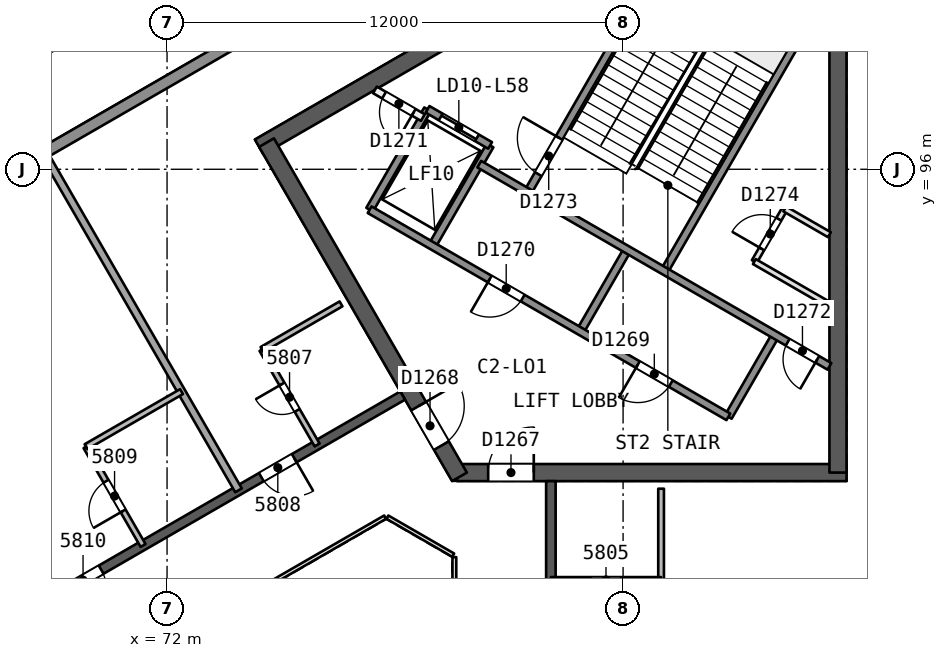
"""IFC4 building model, lengths in metres.
Left out: names, types, materials, properties, quantities, classifications, styles, units other than length and angle.
Written with IfcOpenShell. Run it as: python <this file> out.ifc"""

import sys

from ifc_helpers import new_model, si_unit, direction, frame, frame_2d, origin, place, context, subcontext, project, spatial, rectangle, extrude, element, fill, save


model = new_model("IFC4")
c1 = context("Model", 3, precision=1e-05, world=origin(), true_north=direction((0.0, 1.0)))
c2 = subcontext(c1, "Body", "Model", "MODEL_VIEW")
j1 = project(units=[si_unit("LENGTHUNIT", "METRE"), si_unit("PLANEANGLEUNIT", "RADIAN")], contexts=[c1])
p1 = place(None, origin())
s1 = spatial("IfcSite", under=j1, at=p1, CompositionType="ELEMENT")
p2 = place(p1, origin())
s2 = spatial("IfcBuilding", under=s1, at=p2, CompositionType="ELEMENT")
p3 = place(p2, frame((0.0, 0.0, 235.4)))
s3 = spatial("IfcBuildingStorey", under=s2, at=p3, CompositionType="ELEMENT", Elevation=235.4)
p4 = place(p3, frame((79.63, 88.019, 0.0), z_axis=(0.0, 0.0, 1.0), x_axis=(1.0, 0.0, 0.0)))
e1 = element("IfcWall", 1, at=p4, inside=s3, PredefinedType="SHEAR", context=c2, shape_type="SweptSolid", body=[
    extrude(rectangle(XDim=10.25, YDim=0.45, at=frame_2d((5.125, 0.0))), origin(), (0.0, 0.0, 1.0), 3.7),
])
p5 = place(p4, frame((0.82, 0.0, 0.0)))
e2 = element("IfcOpeningElement", 2, at=p5, cuts=e1, PredefinedType="OPENING", context=c2, shape_type="SweptSolid", body=[
    extrude(rectangle(XDim=1.2, YDim=2.1, at=frame_2d((0.6, 1.05))), frame((0.0, 0.235, 0.0), z_axis=(0.0, -1.0, 0.0), x_axis=(1.0, 0.0, 0.0)), (0.0, 0.0, 1.0), 0.471),
])
p6 = place(p3, frame((89.655, 88.019, 0.0), z_axis=(0.0, 0.0, 1.0), x_axis=(0.0, 1.0, 0.0)))
e3 = element("IfcWall", 3, at=p6, inside=s3, PredefinedType="SHEAR", context=c2, shape_type="SweptSolid", body=[
    extrude(rectangle(XDim=14.108, YDim=0.45, at=frame_2d((7.054, 0.0))), origin(), (0.0, 0.0, 1.0), 3.7),
])
p7 = place(p3, frame((86.723, 103.69, 0.0), z_axis=(0.0, 0.0, 1.0), x_axis=(-0.866022713978, -0.500004658852, 0.0)))
e4 = element("IfcWall", 4, at=p7, inside=s3, PredefinedType="SHEAR", context=c2, shape_type="SweptSolid", body=[
    extrude(rectangle(XDim=14.203, YDim=0.45, at=frame_2d((7.102, 0.0))), origin(), (0.0, 0.0, 1.0), 3.7),
])
p8 = place(p3, frame((74.617, 96.701, 0.0), z_axis=(0.0, 0.0, 1.0), x_axis=(0.499994385119, -0.866028645513, 0.0)))
e5 = element("IfcWall", 5, at=p8, inside=s3, PredefinedType="SHEAR", context=c2, shape_type="SweptSolid", body=[
    extrude(rectangle(XDim=10.155, YDim=0.45, at=frame_2d((5.077, 0.0))), origin(), (0.0, 0.0, 1.0), 3.7),
])
p9 = place(p8, frame((8.005, 0.0, 0.0)))
e6 = element("IfcOpeningElement", 6, at=p9, cuts=e5, PredefinedType="OPENING", context=c2, shape_type="SweptSolid", body=[
    extrude(rectangle(XDim=1.2, YDim=2.1, at=frame_2d((0.6, 1.05))), frame((0.0, 0.235, 0.0), z_axis=(0.0, -1.0, 0.0), x_axis=(1.0, 0.0, 0.0)), (0.0, 0.0, 1.0), 0.471),
])
p10 = place(p3, frame((82.1, 72.206, 0.0), z_axis=(0.0, 0.0, 1.0), x_axis=(0.0, 1.0, 0.0)))
e7 = element("IfcWall", 7, at=p10, inside=s3, PredefinedType="SHEAR", context=c2, shape_type="SweptSolid", body=[
    extrude(rectangle(XDim=15.588, YDim=0.25, at=frame_2d((7.794, 0.0))), origin(), (0.0, 0.0, 1.0), 3.3),
])
p11 = place(p10, frame((2.15, 0.0, 0.0)))
e8 = element("IfcOpeningElement", 8, at=p11, cuts=e7, PredefinedType="OPENING", context=c2, shape_type="SweptSolid", body=[
    extrude(rectangle(XDim=1.0, YDim=2.1, at=frame_2d((0.5, 1.05))), frame((0.0, 0.135, 0.0), z_axis=(0.0, -1.0, 0.0), x_axis=(1.0, 0.0, 0.0)), (0.0, 0.0, 1.0), 0.271),
])
p12 = place(p10, frame((7.662, 0.0, 0.0)))
e9 = element("IfcOpeningElement", 9, at=p12, cuts=e7, PredefinedType="OPENING", context=c2, shape_type="SweptSolid", body=[
    extrude(rectangle(XDim=1.2, YDim=2.4, at=frame_2d((0.6, 1.2))), frame((0.0, 0.135, 0.0), z_axis=(0.0, -1.0, 0.0), x_axis=(1.0, 0.0, 0.0)), (0.0, 0.0, 1.0), 0.271),
])
p13 = place(p10, frame((11.606, 0.0, 0.0)))
e10 = element("IfcOpeningElement", 10, at=p13, cuts=e7, PredefinedType="OPENING", context=c2, shape_type="SweptSolid", body=[
    extrude(rectangle(XDim=1.0, YDim=2.1, at=frame_2d((0.5, 1.05))), frame((0.0, 0.135, 0.0), z_axis=(0.0, -1.0, 0.0), x_axis=(1.0, 0.0, 0.0)), (0.0, 0.0, 1.0), 0.271),
])
p14 = place(p3, frame((78.2, 90.046, 0.0), z_axis=(0.0, 0.0, 1.0), x_axis=(-0.866026492143, -0.499998114903, 0.0)))
e11 = element("IfcWall", 11, at=p14, inside=s3, PredefinedType="SHEAR", context=c2, shape_type="SweptSolid", body=[
    extrude(rectangle(XDim=15.588, YDim=0.25, at=frame_2d((7.794, 0.0))), origin(), (0.0, 0.0, 1.0), 3.3),
])
p15 = place(p14, frame((3.294, 0.0, 0.0)))
e12 = element("IfcOpeningElement", 12, at=p15, cuts=e11, PredefinedType="OPENING", context=c2, shape_type="SweptSolid", body=[
    extrude(rectangle(XDim=1.0, YDim=2.1, at=frame_2d((0.5, 1.05))), frame((0.0, 0.135, 0.0), z_axis=(0.0, -1.0, 0.0), x_axis=(1.0, 0.0, 0.0)), (0.0, 0.0, 1.0), 0.271),
])
p16 = place(p14, frame((9.162, 0.0, 0.0)))
e13 = element("IfcOpeningElement", 13, at=p16, cuts=e11, PredefinedType="OPENING", context=c2, shape_type="SweptSolid", body=[
    extrude(rectangle(XDim=1.1, YDim=2.1, at=frame_2d((0.55, 1.05))), frame((0.0, 0.135, 0.0), z_axis=(0.0, -1.0, 0.0), x_axis=(1.0, 0.0, 0.0)), (0.0, 0.0, 1.0), 0.271),
])
p17 = place(p14, frame((11.762, 0.0, 0.0)))
e14 = element("IfcOpeningElement", 14, at=p17, cuts=e11, PredefinedType="OPENING", context=c2, shape_type="SweptSolid", body=[
    extrude(rectangle(XDim=1.0, YDim=2.1, at=frame_2d((0.5, 1.05))), frame((0.0, 0.135, 0.0), z_axis=(0.0, -1.0, 0.0), x_axis=(1.0, 0.0, 0.0)), (0.0, 0.0, 1.0), 0.271),
])
p18 = place(p3, frame((85.0, 87.595, 0.0), z_axis=(0.0, 0.0, 1.0), x_axis=(0.0, -1.0, 0.0)))
e15 = element("IfcWall", 15, at=p18, inside=s3, PredefinedType="PARTITIONING", context=c2, shape_type="SweptSolid", body=[
    extrude(rectangle(XDim=2.401, YDim=0.15, at=frame_2d((1.2, 0.0))), origin(), (0.0, 0.0, 1.0), 3.3),
])
p19 = place(p3, frame((85.0, 85.194, 0.0), z_axis=(0.0, 0.0, 1.0), x_axis=(-1.0, 0.0, 0.0)))
e16 = element("IfcWall", 16, at=p19, inside=s3, PredefinedType="PARTITIONING", context=c2, shape_type="SweptSolid", body=[
    extrude(rectangle(XDim=2.9, YDim=0.15, at=frame_2d((1.45, 0.0))), origin(), (0.0, 0.0, 1.0), 3.3),
])
p20 = place(p19, frame((1.05, 0.0, 0.0)))
e17 = element("IfcOpeningElement", 17, at=p20, cuts=e16, PredefinedType="OPENING", context=c2, shape_type="SweptSolid", body=[
    extrude(rectangle(XDim=0.8, YDim=2.1, at=frame_2d((0.4, 1.05))), frame((0.0, 0.085, 0.0), z_axis=(0.0, -1.0, 0.0), x_axis=(1.0, 0.0, 0.0)), (0.0, 0.0, 1.0), 0.171),
])
p21 = place(p3, frame((75.948, 88.746, 0.0), z_axis=(0.0, 0.0, 1.0), x_axis=(-0.499987231761, 0.866032775405, 0.0)))
e18 = element("IfcWall", 18, at=p21, inside=s3, PredefinedType="PARTITIONING", context=c2, shape_type="SweptSolid", body=[
    extrude(rectangle(XDim=2.9, YDim=0.15, at=frame_2d((1.45, 0.0))), origin(), (0.0, 0.0, 1.0), 3.3),
])
p22 = place(p21, frame((1.05, 0.0, 0.0)))
e19 = element("IfcOpeningElement", 19, at=p22, cuts=e18, PredefinedType="OPENING", context=c2, shape_type="SweptSolid", body=[
    extrude(rectangle(XDim=0.8, YDim=2.1, at=frame_2d((0.4, 1.05))), frame((0.0, 0.085, 0.0), z_axis=(0.0, -1.0, 0.0), x_axis=(1.0, 0.0, 0.0)), (0.0, 0.0, 1.0), 0.171),
])
p23 = place(p3, frame((74.498, 91.257, 0.0), z_axis=(0.0, 0.0, 1.0), x_axis=(0.866038271014, 0.499977712642, 0.0)))
e20 = element("IfcWall", 20, at=p23, inside=s3, PredefinedType="PARTITIONING", context=c2, shape_type="SweptSolid", body=[
    extrude(rectangle(XDim=2.401, YDim=0.15, at=frame_2d((1.2, 0.0))), origin(), (0.0, 0.0, 1.0), 3.3),
])
p24 = place(p3, frame((68.828, 96.302, 0.0), z_axis=(0.0, 0.0, 1.0), x_axis=(0.499992962407, -0.866029466902, 0.0)))
e21 = element("IfcWall", 21, at=p24, inside=s3, PredefinedType="PARTITIONING", context=c2, shape_type="SweptSolid", body=[
    extrude(rectangle(XDim=10.104, YDim=0.2, at=frame_2d((5.052, 0.0))), origin(), (0.0, 0.0, 1.0), 3.3),
])
p25 = place(p3, frame((71.368, 86.102, 0.0), z_axis=(0.0, 0.0, 1.0), x_axis=(-0.50002537861, 0.866010750942, 0.0)))
e22 = element("IfcWall", 22, at=p25, inside=s3, PredefinedType="PARTITIONING", context=c2, shape_type="SweptSolid", body=[
    extrude(rectangle(XDim=3.0, YDim=0.15, at=frame_2d((1.5, 0.0))), origin(), (0.0, 0.0, 1.0), 3.3),
])
p26 = place(p25, frame((1.05, 0.0, 0.0)))
e23 = element("IfcOpeningElement", 23, at=p26, cuts=e22, PredefinedType="OPENING", context=c2, shape_type="SweptSolid", body=[
    extrude(rectangle(XDim=0.9, YDim=2.1, at=frame_2d((0.45, 1.05))), frame((0.0, 0.085, 0.0), z_axis=(0.0, -1.0, 0.0), x_axis=(1.0, 0.0, 0.0)), (0.0, 0.0, 1.0), 0.171),
])
p27 = place(p3, frame((69.868, 88.7, 0.0), z_axis=(0.0, 0.0, 1.0), x_axis=(0.865996321171, 0.50005036918, 0.0)))
e24 = element("IfcWall", 24, at=p27, inside=s3, PredefinedType="PARTITIONING", context=c2, shape_type="SweptSolid", body=[
    extrude(rectangle(XDim=2.9, YDim=0.15, at=frame_2d((1.45, 0.0))), origin(), (0.0, 0.0, 1.0), 3.3),
])
p28 = place(p3, frame((44.715, 82.552, 0.0), z_axis=(0.0, 0.0, 1.0), x_axis=(0.866025334516, 0.500000119977, 0.0)))
e25 = element("IfcWall", 25, at=p28, inside=s3, PredefinedType="SOLIDWALL", context=c2, shape_type="SweptSolid", body=[
    extrude(rectangle(XDim=49.903, YDim=0.3, at=frame_2d((24.952, 0.0))), origin(), (0.0, 0.0, 1.0), 3.3),
])
p29 = place(p28, frame((23.284, 0.0, 0.0)))
e26 = element("IfcOpeningElement", 26, at=p29, cuts=e25, PredefinedType="OPENING", context=c2, shape_type="SweptSolid", body=[
    extrude(rectangle(XDim=2.4, YDim=2.4, at=frame_2d((1.2, 1.2))), frame((0.0, 0.161, 0.0), z_axis=(0.0, -1.0, 0.0), x_axis=(1.0, 0.0, 0.0)), (0.0, 0.0, 1.0), 0.321),
])
p30 = place(p28, frame((37.674, 0.0, 0.0)))
e27 = element("IfcOpeningElement", 27, at=p30, cuts=e25, PredefinedType="OPENING", context=c2, shape_type="SweptSolid", body=[
    extrude(rectangle(XDim=2.4, YDim=2.4, at=frame_2d((1.2, 1.2))), frame((0.0, 0.161, 0.0), z_axis=(0.0, -1.0, 0.0), x_axis=(1.0, 0.0, 0.0)), (0.0, 0.0, 1.0), 0.321),
])
p31 = place(p28, frame((9.362, 0.0, 0.0)))
e28 = element("IfcOpeningElement", 28, at=p31, cuts=e25, PredefinedType="OPENING", context=c2, shape_type="SweptSolid", body=[
    extrude(rectangle(XDim=2.4, YDim=2.4, at=frame_2d((1.2, 1.2))), frame((0.0, 0.161, 0.0), z_axis=(0.0, -1.0, 0.0), x_axis=(1.0, 0.0, 0.0)), (0.0, 0.0, 1.0), 0.321),
])
p32 = place(p3, frame((86.77, 89.486, 0.0), z_axis=(0.0, 0.0, 1.0), x_axis=(0.499961042966, 0.86604789447, 0.0)))
e29 = element("IfcWall", 29, at=p32, inside=s3, PredefinedType="SOLIDWALL", context=c2, shape_type="SweptSolid", body=[
    extrude(rectangle(XDim=2.48, YDim=0.2, at=frame_2d((1.24, 0.0))), origin(), (0.0, 0.0, 1.0), 3.3),
])
p33 = place(p3, frame((87.454, 93.571, 0.0), z_axis=(0.0, 0.0, 1.0), x_axis=(0.499995408039, 0.866028054938, 0.0)))
e30 = element("IfcWall", 30, at=p33, inside=s3, PredefinedType="PARTITIONING", context=c2, shape_type="SweptSolid", body=[
    extrude(rectangle(XDim=1.6, YDim=0.15, at=frame_2d((0.8, 0.0))), origin(), (0.0, 0.0, 1.0), 3.3),
])
p34 = place(p33, frame((0.387, 0.0, 0.0)))
e31 = element("IfcOpeningElement", 31, at=p34, cuts=e30, PredefinedType="OPENING", context=c2, shape_type="SweptSolid", body=[
    extrude(rectangle(XDim=0.9, YDim=2.1, at=frame_2d((0.45, 1.05))), frame((0.0, 0.085, 0.0), z_axis=(0.0, -1.0, 0.0), x_axis=(1.0, 0.0, 0.0)), (0.0, 0.0, 1.0), 0.171),
])
p35 = place(p3, frame((85.087, 93.321, 0.0), z_axis=(0.0, 0.0, 1.0), x_axis=(0.500019787375, 0.866013979237, 0.0)))
e32 = element("IfcWall", 32, at=p35, inside=s3, PredefinedType="SOLIDWALL", context=c2, shape_type="SweptSolid", body=[
    extrude(rectangle(XDim=7.7, YDim=0.2, at=frame_2d((3.85, 0.0))), origin(), (0.0, 0.0, 1.0), 3.3),
])
p36 = place(p3, frame((82.873, 91.736, 0.0), z_axis=(0.0, 0.0, 1.0), x_axis=(0.499961042966, 0.86604789447, 0.0)))
e33 = element("IfcWall", 33, at=p36, inside=s3, PredefinedType="SOLIDWALL", context=c2, shape_type="SweptSolid", body=[
    extrude(rectangle(XDim=2.48, YDim=0.2, at=frame_2d((1.24, 0.0))), origin(), (0.0, 0.0, 1.0), 3.3),
])
p37 = place(p3, frame((81.493, 95.396, 0.0), z_axis=(0.0, 0.0, 1.0), x_axis=(0.500006057782, 0.866021906294, 0.0)))
e34 = element("IfcWall", 34, at=p37, inside=s3, PredefinedType="SOLIDWALL", context=c2, shape_type="SweptSolid", body=[
    extrude(rectangle(XDim=7.7, YDim=0.2, at=frame_2d((3.85, 0.0))), origin(), (0.0, 0.0, 1.0), 3.3),
])
p38 = place(p37, frame((0.55, 0.0, 0.0)))
e35 = element("IfcOpeningElement", 35, at=p38, cuts=e34, PredefinedType="OPENING", context=c2, shape_type="SweptSolid", body=[
    extrude(rectangle(XDim=1.1, YDim=2.1, at=frame_2d((0.55, 1.05))), frame((0.0, 0.11, 0.0), z_axis=(0.0, -1.0, 0.0), x_axis=(1.0, 0.0, 0.0)), (0.0, 0.0, 1.0), 0.221),
])
for number, where, z_axis, x_axis in (
    (36, (78.976, 93.986, 0.0), (0.0, 0.0, 1.0), (0.5, 0.866, 0.0)),
    (37, (77.33, 94.936, 0.0), (0.0, 0.0, 1.0), (0.5, 0.866, 0.0)),
):
    element("IfcWall", number, at=place(p3, frame(where, z_axis=z_axis, x_axis=x_axis)), inside=s3, PredefinedType="SOLIDWALL", context=c2, shape_type="SweptSolid", body=[
        extrude(rectangle(XDim=3.05, YDim=0.2, at=frame_2d((1.525, 0.0))), origin(), (0.0, 0.0, 1.0), 3.3),
    ])
p39 = place(p3, frame((86.77, 89.486, 0.0), z_axis=(0.0, 0.0, 1.0), x_axis=(-0.86601811187, 0.500012629753, 0.0)))
e38 = element("IfcWall", 38, at=p39, inside=s3, PredefinedType="SOLIDWALL", context=c2, shape_type="SweptSolid", body=[
    extrude(rectangle(XDim=10.9, YDim=0.2, at=frame_2d((5.45, 0.0))), origin(), (0.0, 0.0, 1.0), 3.3),
])
p40 = place(p39, frame((1.75, 0.0, 0.0)))
e39 = element("IfcOpeningElement", 39, at=p40, cuts=e38, PredefinedType="OPENING", context=c2, shape_type="SweptSolid", body=[
    extrude(rectangle(XDim=1.0, YDim=2.1, at=frame_2d((0.5, 1.05))), frame((0.0, 0.11, 0.0), z_axis=(0.0, -1.0, 0.0), x_axis=(1.0, 0.0, 0.0)), (0.0, 0.0, 1.0), 0.221),
])
p41 = place(p39, frame((6.25, 0.0, 0.0)))
e40 = element("IfcOpeningElement", 40, at=p41, cuts=e38, PredefinedType="OPENING", context=c2, shape_type="SweptSolid", body=[
    extrude(rectangle(XDim=1.0, YDim=2.1, at=frame_2d((0.5, 1.05))), frame((0.0, 0.11, 0.0), z_axis=(0.0, -1.0, 0.0), x_axis=(1.0, 0.0, 0.0)), (0.0, 0.0, 1.0), 0.221),
])
p42 = place(p3, frame((89.43, 90.814, 0.0), z_axis=(0.0, 0.0, 1.0), x_axis=(-0.866018983788, 0.500011119594, 0.0)))
e41 = element("IfcWall", 41, at=p42, inside=s3, PredefinedType="SOLIDWALL", context=c2, shape_type="SweptSolid", body=[
    extrude(rectangle(XDim=10.64, YDim=0.2, at=frame_2d((5.32, 0.0))), origin(), (0.0, 0.0, 1.0), 3.3),
])
p43 = place(p42, frame((0.37, 0.0, 0.0)))
e42 = element("IfcOpeningElement", 42, at=p43, cuts=e41, PredefinedType="OPENING", context=c2, shape_type="SweptSolid", body=[
    extrude(rectangle(XDim=0.9, YDim=2.1, at=frame_2d((0.45, 1.05))), frame((0.0, 0.11, 0.0), z_axis=(0.0, -1.0, 0.0), x_axis=(1.0, 0.0, 0.0)), (0.0, 0.0, 1.0), 0.221),
])
p44 = place(p3, frame((78.73, 97.361, 0.0), z_axis=(0.0, 0.0, 1.0), x_axis=(-0.866045896294, 0.499964504253, 0.0)))
e43 = element("IfcWall", 43, at=p44, inside=s3, PredefinedType="PARTITIONING", context=c2, shape_type="SweptSolid", body=[
    extrude(rectangle(XDim=1.455, YDim=0.2, at=frame_2d((0.728, 0.0))), origin(), (0.0, 0.0, 1.0), 3.3),
])
p45 = place(p44, frame((0.278, 0.0, 0.0)))
e44 = element("IfcOpeningElement", 44, at=p45, cuts=e43, PredefinedType="OPENING", context=c2, shape_type="SweptSolid", body=[
    extrude(rectangle(XDim=0.9, YDim=2.1, at=frame_2d((0.45, 1.05))), frame((0.0, 0.11, 0.0), z_axis=(0.0, -1.0, 0.0), x_axis=(1.0, 0.0, 0.0)), (0.0, 0.0, 1.0), 0.221),
])
p46 = place(p3, frame((80.5, 96.627, 0.0), z_axis=(0.0, 0.0, 1.0), x_axis=(-0.86601224135, 0.500022797313, 0.0)))
e45 = element("IfcWall", 45, at=p46, inside=s3, PredefinedType="SOLIDWALL", context=c2, shape_type="SweptSolid", body=[
    extrude(rectangle(XDim=1.9, YDim=0.2, at=frame_2d((0.95, 0.0))), origin(), (0.0, 0.0, 1.0), 3.3),
])
p47 = place(p46, frame((0.4, 0.0, 0.0)))
e46 = element("IfcOpeningElement", 46, at=p47, cuts=e45, PredefinedType="OPENING", context=c2, shape_type="SweptSolid", body=[
    extrude(rectangle(XDim=1.1, YDim=2.1, at=frame_2d((0.55, 1.05))), frame((0.0, 0.11, 0.0), z_axis=(0.0, -1.0, 0.0), x_axis=(1.0, 0.0, 0.0)), (0.0, 0.0, 1.0), 0.221),
])
p48 = place(p3, frame((89.43, 92.43, 0.0), z_axis=(0.0, 0.0, 1.0), x_axis=(-0.866048373726, 0.499960212783, 0.0)))
e47 = element("IfcWall", 47, at=p48, inside=s3, PredefinedType="PARTITIONING", context=c2, shape_type="SweptSolid", body=[
    extrude(rectangle(XDim=2.281, YDim=0.15, at=frame_2d((1.141, 0.0))), origin(), (0.0, 0.0, 1.0), 3.3),
])
p49 = place(p3, frame((89.43, 94.278, 0.0), z_axis=(0.0, 0.0, 1.0), x_axis=(-0.865987941628, 0.500064880745, 0.0)))
e48 = element("IfcWall", 48, at=p49, inside=s3, PredefinedType="PARTITIONING", context=c2, shape_type="SweptSolid", body=[
    extrude(rectangle(XDim=1.358, YDim=0.15, at=frame_2d((0.679, 0.0))), origin(), (0.0, 0.0, 1.0), 3.3),
])
p50 = place(p3, frame((79.56, 74.206, 0.0), z_axis=(0.0, 0.0, 1.0), x_axis=(0.0, 1.0, 0.0)))
e49 = element("IfcWall", 49, at=p50, inside=s3, PredefinedType="PARTITIONING", context=c2, shape_type="SweptSolid", body=[
    extrude(rectangle(XDim=11.588, YDim=0.1, at=frame_2d((5.794, 0.0))), origin(), (0.0, 0.0, 1.0), 3.3),
])
p51 = place(p3, frame((79.53, 85.846, 0.0), z_axis=(0.0, 0.0, 1.0), x_axis=(-0.866041268327, 0.499972520799, 0.0)))
e50 = element("IfcWall", 50, at=p51, inside=s3, PredefinedType="PARTITIONING", context=c2, shape_type="SweptSolid", body=[
    extrude(rectangle(XDim=2.0, YDim=0.1, at=frame_2d((1.0, 0.0))), origin(), (0.0, 0.0, 1.0), 3.3),
])
p52 = place(p3, frame((77.738, 86.846, 0.0), z_axis=(0.0, 0.0, 1.0), x_axis=(-0.866026658274, -0.499997827154, 0.0)))
e51 = element("IfcWall", 51, at=p52, inside=s3, PredefinedType="PARTITIONING", context=c2, shape_type="SweptSolid", body=[
    extrude(rectangle(XDim=11.588, YDim=0.1, at=frame_2d((5.794, 0.0))), origin(), (0.0, 0.0, 1.0), 3.3),
])
p53 = place(p22, origin())
e52 = element("IfcDoor", 52, at=p53, inside=s3, OperationType="SINGLE_SWING_RIGHT", PredefinedType="NOTDEFINED", context=c2, shape_type="SweptSolid", body=[
    extrude(rectangle(XDim=0.8, YDim=2.1, at=frame_2d((0.4, 1.05))), frame((0.0, 0.025, 0.0), z_axis=(0.0, -1.0, 0.0), x_axis=(1.0, 0.0, 0.0)), (0.0, 0.0, 1.0), 0.05),
])
fill(e19, e52)
p54 = place(p15, origin())
e53 = element("IfcDoor", 53, at=p54, inside=s3, OperationType="SINGLE_SWING_LEFT", PredefinedType="NOTDEFINED", context=c2, shape_type="SweptSolid", body=[
    extrude(rectangle(XDim=1.0, YDim=2.1, at=frame_2d((0.5, 1.05))), frame((0.0, 0.025, 0.0), z_axis=(0.0, -1.0, 0.0), x_axis=(1.0, 0.0, 0.0)), (0.0, 0.0, 1.0), 0.05),
])
fill(e12, e53)
p55 = place(p26, origin())
e54 = element("IfcDoor", 54, at=p55, inside=s3, OperationType="SINGLE_SWING_LEFT", PredefinedType="NOTDEFINED", context=c2, shape_type="SweptSolid", body=[
    extrude(rectangle(XDim=0.9, YDim=2.1, at=frame_2d((0.45, 1.05))), frame((0.0, 0.025, 0.0), z_axis=(0.0, -1.0, 0.0), x_axis=(1.0, 0.0, 0.0)), (0.0, 0.0, 1.0), 0.05),
])
fill(e23, e54)
p56 = place(p16, origin())
e55 = element("IfcDoor", 55, at=p56, inside=s3, OperationType="SINGLE_SWING_RIGHT", PredefinedType="NOTDEFINED", context=c2, shape_type="SweptSolid", body=[
    extrude(rectangle(XDim=1.1, YDim=2.1, at=frame_2d((0.55, 1.05))), frame((0.0, 0.025, 0.0), z_axis=(0.0, -1.0, 0.0), x_axis=(1.0, 0.0, 0.0)), (0.0, 0.0, 1.0), 0.05),
])
fill(e13, e55)
p57 = place(p5, origin())
e56 = element("IfcDoor", 56, at=p57, inside=s3, OperationType="SINGLE_SWING_RIGHT", PredefinedType="NOTDEFINED", context=c2, shape_type="SweptSolid", body=[
    extrude(rectangle(XDim=1.2, YDim=2.1, at=frame_2d((0.6, 1.05))), frame((0.0, 0.025, 0.0), z_axis=(0.0, -1.0, 0.0), x_axis=(1.0, 0.0, 0.0)), (0.0, 0.0, 1.0), 0.05),
])
fill(e2, e56)
p58 = place(p9, origin())
e57 = element("IfcDoor", 57, at=p58, inside=s3, OperationType="SINGLE_SWING_LEFT", PredefinedType="NOTDEFINED", context=c2, shape_type="SweptSolid", body=[
    extrude(rectangle(XDim=1.2, YDim=2.1, at=frame_2d((0.6, 1.05))), frame((0.0, 0.025, 0.0), z_axis=(0.0, -1.0, 0.0), x_axis=(1.0, 0.0, 0.0)), (0.0, 0.0, 1.0), 0.05),
])
fill(e6, e57)
p59 = place(p47, origin())
e58 = element("IfcDoor", 58, at=p59, inside=s3, OperationType="SLIDING_TO_RIGHT", PredefinedType="NOTDEFINED", context=c2, shape_type="SweptSolid", body=[
    extrude(rectangle(XDim=1.1, YDim=2.1, at=frame_2d((0.55, 1.05))), frame((0.0, 0.025, 0.0), z_axis=(0.0, -1.0, 0.0), x_axis=(1.0, 0.0, 0.0)), (0.0, 0.0, 1.0), 0.05),
])
fill(e46, e58)
p60 = place(p40, origin())
e59 = element("IfcDoor", 59, at=p60, inside=s3, OperationType="SINGLE_SWING_RIGHT", PredefinedType="NOTDEFINED", context=c2, shape_type="SweptSolid", body=[
    extrude(rectangle(XDim=1.0, YDim=2.1, at=frame_2d((0.5, 1.05))), frame((0.0, 0.025, 0.0), z_axis=(0.0, -1.0, 0.0), x_axis=(1.0, 0.0, 0.0)), (0.0, 0.0, 1.0), 0.05),
])
fill(e39, e59)
p61 = place(p41, origin())
e60 = element("IfcDoor", 60, at=p61, inside=s3, OperationType="SINGLE_SWING_RIGHT", PredefinedType="NOTDEFINED", context=c2, shape_type="SweptSolid", body=[
    extrude(rectangle(XDim=1.0, YDim=2.1, at=frame_2d((0.5, 1.05))), frame((0.0, 0.025, 0.0), z_axis=(0.0, -1.0, 0.0), x_axis=(1.0, 0.0, 0.0)), (0.0, 0.0, 1.0), 0.05),
])
fill(e40, e60)
p62 = place(p45, origin())
e61 = element("IfcDoor", 61, at=p62, inside=s3, OperationType="SINGLE_SWING_LEFT", PredefinedType="NOTDEFINED", context=c2, shape_type="SweptSolid", body=[
    extrude(rectangle(XDim=0.9, YDim=2.1, at=frame_2d((0.45, 1.05))), frame((0.0, 0.025, 0.0), z_axis=(0.0, -1.0, 0.0), x_axis=(1.0, 0.0, 0.0)), (0.0, 0.0, 1.0), 0.05),
])
fill(e44, e61)
p63 = place(p43, origin())
e62 = element("IfcDoor", 62, at=p63, inside=s3, OperationType="SINGLE_SWING_LEFT", PredefinedType="NOTDEFINED", context=c2, shape_type="SweptSolid", body=[
    extrude(rectangle(XDim=0.9, YDim=2.1, at=frame_2d((0.45, 1.05))), frame((0.0, 0.025, 0.0), z_axis=(0.0, -1.0, 0.0), x_axis=(1.0, 0.0, 0.0)), (0.0, 0.0, 1.0), 0.05),
])
fill(e42, e62)
p64 = place(p38, origin())
e63 = element("IfcDoor", 63, at=p64, inside=s3, OperationType="SINGLE_SWING_RIGHT", PredefinedType="NOTDEFINED", context=c2, shape_type="SweptSolid", body=[
    extrude(rectangle(XDim=1.1, YDim=2.1, at=frame_2d((0.55, 1.05))), frame((0.0, 0.025, 0.0), z_axis=(0.0, -1.0, 0.0), x_axis=(1.0, 0.0, 0.0)), (0.0, 0.0, 1.0), 0.05),
])
fill(e35, e63)
p65 = place(p34, origin())
e64 = element("IfcDoor", 64, at=p65, inside=s3, OperationType="SINGLE_SWING_LEFT", PredefinedType="NOTDEFINED", context=c2, shape_type="SweptSolid", body=[
    extrude(rectangle(XDim=0.9, YDim=2.1, at=frame_2d((0.45, 1.05))), frame((0.0, 0.025, 0.0), z_axis=(0.0, -1.0, 0.0), x_axis=(1.0, 0.0, 0.0)), (0.0, 0.0, 1.0), 0.05),
])
fill(e31, e64)
save(model, sys.argv[1])
